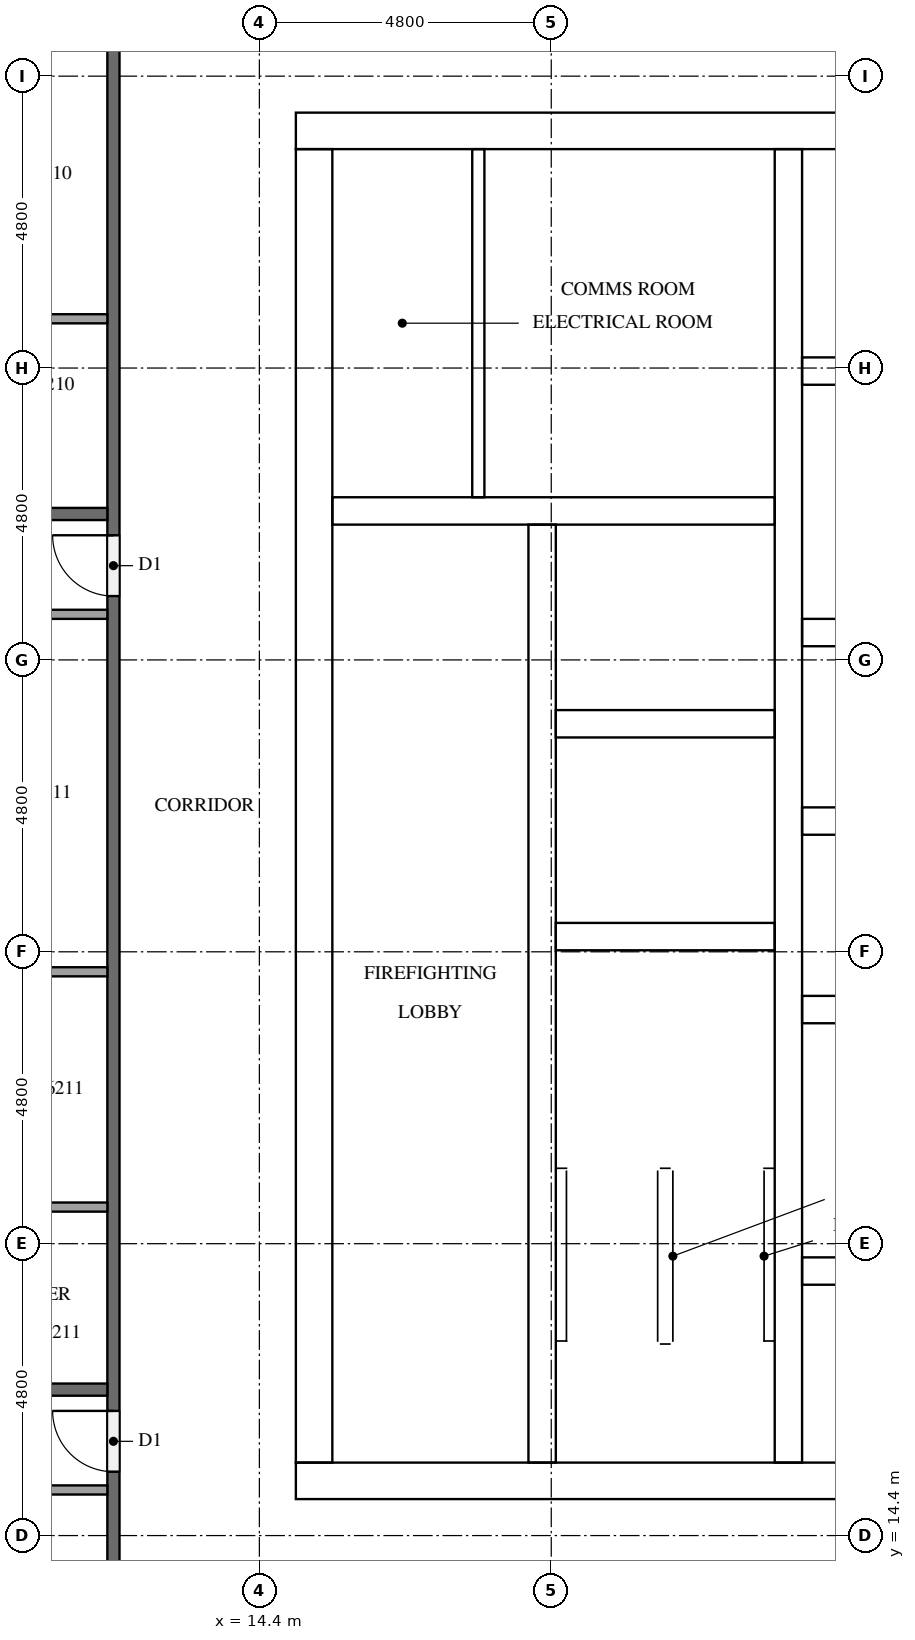
"""IFC4 building model, lengths in metres.
Left out: names, types, materials, properties, quantities, classifications, styles, units other than length and angle.
Written with IfcOpenShell. Run it as: python <this file> out.ifc"""

import sys

from ifc_helpers import new_model, si_unit, direction, frame, frame_2d, origin, place, context, subcontext, project, spatial, rectangle, extrude, element, fill, save


model = new_model("IFC4")
c1 = context("Model", 3, precision=1e-05, world=origin(), true_north=direction((0.0, 1.0)))
c2 = subcontext(c1, "Body", "Model", "MODEL_VIEW")
j1 = project(units=[si_unit("LENGTHUNIT", "METRE"), si_unit("PLANEANGLEUNIT", "RADIAN")], contexts=[c1])
p1 = place(None, origin())
s1 = spatial("IfcSite", under=j1, at=p1, CompositionType="ELEMENT")
p2 = place(p1, origin())
s2 = spatial("IfcBuilding", under=s1, at=p2, CompositionType="ELEMENT")
p3 = place(p2, frame((0.0, 0.0, 238.7)))
s3 = spatial("IfcBuildingStorey", under=s2, at=p3, CompositionType="ELEMENT", Elevation=238.7)
p4 = place(p3, frame((15.0, 15.3, 0.0), z_axis=(0.0, 0.0, 1.0), x_axis=(1.0, 0.0, 0.0)))
e1 = element("IfcWall", 1, at=p4, inside=s3, PredefinedType="SHEAR", context=c2, shape_type="SweptSolid", body=[
    extrude(rectangle(XDim=32.4, YDim=0.6, at=frame_2d((16.2, 0.0))), origin(), (0.0, 0.0, 1.0), 3.2),
])
p5 = place(p4, frame((15.3, 0.0, 0.0)))
e2 = element("IfcOpeningElement", 2, at=p5, cuts=e1, PredefinedType="OPENING", context=c2, shape_type="SweptSolid", body=[
    extrude(rectangle(XDim=1.8, YDim=2.1, at=frame_2d((0.9, 1.05))), frame((0.0, 0.31, 0.0), z_axis=(0.0, -1.0, 0.0), x_axis=(1.0, 0.0, 0.0)), (0.0, 0.0, 1.0), 0.62),
])
p6 = place(p3, frame((15.0, 37.5, 0.0), z_axis=(0.0, 0.0, 1.0), x_axis=(1.0, 0.0, 0.0)))
e3 = element("IfcWall", 3, at=p6, inside=s3, PredefinedType="SHEAR", context=c2, shape_type="SweptSolid", body=[
    extrude(rectangle(XDim=32.4, YDim=0.6, at=frame_2d((16.2, 0.0))), origin(), (0.0, 0.0, 1.0), 3.2),
])
p7 = place(p6, frame((15.3, 0.0, 0.0)))
e4 = element("IfcOpeningElement", 4, at=p7, cuts=e3, PredefinedType="OPENING", context=c2, shape_type="SweptSolid", body=[
    extrude(rectangle(XDim=1.8, YDim=2.1, at=frame_2d((0.9, 1.05))), frame((0.0, 0.31, 0.0), z_axis=(0.0, -1.0, 0.0), x_axis=(1.0, 0.0, 0.0)), (0.0, 0.0, 1.0), 0.62),
])
p8 = place(p6, frame((1.25, 0.0, 0.0)))
e5 = element("IfcOpeningElement", 5, at=p8, cuts=e3, PredefinedType="OPENING", context=c2, shape_type="SweptSolid", body=[
    extrude(rectangle(XDim=1.0, YDim=2.1, at=frame_2d((0.5, 1.05))), frame((0.0, 0.31, 0.0), z_axis=(0.0, -1.0, 0.0), x_axis=(1.0, 0.0, 0.0)), (0.0, 0.0, 1.0), 0.62),
])
p9 = place(p6, frame((4.988, 0.0, 0.0)))
e6 = element("IfcOpeningElement", 6, at=p9, cuts=e3, PredefinedType="OPENING", context=c2, shape_type="SweptSolid", body=[
    extrude(rectangle(XDim=1.0, YDim=2.1, at=frame_2d((0.5, 1.05))), frame((0.0, 0.31, 0.0), z_axis=(0.0, -1.0, 0.0), x_axis=(1.0, 0.0, 0.0)), (0.0, 0.0, 1.0), 0.62),
])
p10 = place(p3, frame((15.3, 15.6, 0.0), z_axis=(0.0, 0.0, 1.0), x_axis=(0.0, 1.0, 0.0)))
e7 = element("IfcWall", 7, at=p10, inside=s3, PredefinedType="SHEAR", context=c2, shape_type="SweptSolid", body=[
    extrude(rectangle(XDim=21.6, YDim=0.6, at=frame_2d((10.8, 0.0))), origin(), (0.0, 0.0, 1.0), 3.2),
])
p11 = place(p10, frame((5.16, 0.0, 0.0)))
e8 = element("IfcOpeningElement", 8, at=p11, cuts=e7, PredefinedType="OPENING", context=c2, shape_type="SweptSolid", body=[
    extrude(rectangle(XDim=1.2, YDim=2.1, at=frame_2d((0.6, 1.05))), frame((0.0, 0.31, 0.0), z_axis=(0.0, -1.0, 0.0), x_axis=(1.0, 0.0, 0.0)), (0.0, 0.0, 1.0), 0.62),
])
p12 = place(p3, frame((19.05, 15.6, 0.0), z_axis=(0.0, 0.0, 1.0), x_axis=(0.0, 1.0, 0.0)))
e9 = element("IfcWall", 9, at=p12, inside=s3, PredefinedType="SHEAR", context=c2, shape_type="SweptSolid", body=[
    extrude(rectangle(XDim=15.425, YDim=0.45, at=frame_2d((7.712, 0.0))), origin(), (0.0, 0.0, 1.0), 3.2),
])
p13 = place(p12, frame((9.85, 0.0, 0.0)))
e10 = element("IfcOpeningElement", 10, at=p13, cuts=e9, PredefinedType="OPENING", context=c2, shape_type="SweptSolid", body=[
    extrude(rectangle(XDim=1.1, YDim=2.1, at=frame_2d((0.55, 1.05))), frame((0.0, 0.235, 0.0), z_axis=(0.0, -1.0, 0.0), x_axis=(1.0, 0.0, 0.0)), (0.0, 0.0, 1.0), 0.47),
])
p14 = place(p12, frame((13.35, 0.0, 0.0)))
e11 = element("IfcOpeningElement", 11, at=p14, cuts=e9, PredefinedType="OPENING", context=c2, shape_type="SweptSolid", body=[
    extrude(rectangle(XDim=1.1, YDim=2.1, at=frame_2d((0.55, 1.05))), frame((0.0, 0.235, 0.0), z_axis=(0.0, -1.0, 0.0), x_axis=(1.0, 0.0, 0.0)), (0.0, 0.0, 1.0), 0.47),
])
p15 = place(p12, frame((0.6, 0.0, 0.0)))
e12 = element("IfcOpeningElement", 12, at=p15, cuts=e9, PredefinedType="OPENING", context=c2, shape_type="SweptSolid", body=[
    extrude(rectangle(XDim=1.2, YDim=2.1, at=frame_2d((0.6, 1.05))), frame((0.0, 0.235, 0.0), z_axis=(0.0, -1.0, 0.0), x_axis=(1.0, 0.0, 0.0)), (0.0, 0.0, 1.0), 0.47),
])
p16 = place(p3, frame((23.1, 15.6, 0.0), z_axis=(0.0, 0.0, 1.0), x_axis=(0.0, 1.0, 0.0)))
e13 = element("IfcWall", 13, at=p16, inside=s3, PredefinedType="SHEAR", context=c2, shape_type="SweptSolid", body=[
    extrude(rectangle(XDim=21.6, YDim=0.45, at=frame_2d((10.8, 0.0))), origin(), (0.0, 0.0, 1.0), 3.2),
])
for number, where, z_axis, x_axis in (
    (14, (19.275, 24.25, 0.0), (0.0, 0.0, 1.0), (1.0, 0.0, 0.0)),
    (15, (19.275, 27.75, 0.0), (0.0, 0.0, 1.0), (1.0, 0.0, 0.0)),
):
    element("IfcWall", number, at=place(p3, frame(where, z_axis=z_axis, x_axis=x_axis)), inside=s3, PredefinedType="SHEAR", context=c2, shape_type="SweptSolid", body=[
        extrude(rectangle(XDim=3.6, YDim=0.45, at=frame_2d((1.8, 0.0))), origin(), (0.0, 0.0, 1.0), 3.2),
    ])
p17 = place(p3, frame((15.6, 31.25, 0.0), z_axis=(0.0, 0.0, 1.0), x_axis=(1.0, 0.0, 0.0)))
e16 = element("IfcWall", 16, at=p17, inside=s3, PredefinedType="SHEAR", context=c2, shape_type="SweptSolid", body=[
    extrude(rectangle(XDim=7.275, YDim=0.45, at=frame_2d((3.637, 0.0))), origin(), (0.0, 0.0, 1.0), 3.2),
])
p18 = place(p3, frame((23.325, 18.75, 0.0), z_axis=(0.0, 0.0, 1.0), x_axis=(1.0, 0.0, 0.0)))
e17 = element("IfcWall", 17, at=p18, inside=s3, PredefinedType="SHEAR", context=c2, shape_type="SweptSolid", body=[
    extrude(rectangle(XDim=5.6, YDim=0.45, at=frame_2d((2.8, 0.0))), origin(), (0.0, 0.0, 1.0), 3.2),
])
p19 = place(p18, frame((1.046, 0.0, 0.0)))
e18 = element("IfcOpeningElement", 18, at=p19, cuts=e17, PredefinedType="OPENING", context=c2, shape_type="SweptSolid", body=[
    extrude(rectangle(XDim=1.0, YDim=2.1, at=frame_2d((0.5, 1.05))), frame((0.0, 0.235, 0.0), z_axis=(0.0, -1.0, 0.0), x_axis=(1.0, 0.0, 0.0)), (0.0, 0.0, 1.0), 0.47),
])
p20 = place(p18, frame((3.721, 0.0, 0.0)))
e19 = element("IfcOpeningElement", 19, at=p20, cuts=e17, PredefinedType="OPENING", context=c2, shape_type="SweptSolid", body=[
    extrude(rectangle(XDim=1.0, YDim=2.1, at=frame_2d((0.5, 1.05))), frame((0.0, 0.235, 0.0), z_axis=(0.0, -1.0, 0.0), x_axis=(1.0, 0.0, 0.0)), (0.0, 0.0, 1.0), 0.47),
])
p21 = place(p3, frame((23.325, 23.05, 0.0), z_axis=(0.0, 0.0, 1.0), x_axis=(1.0, 0.0, 0.0)))
e20 = element("IfcWall", 20, at=p21, inside=s3, PredefinedType="SHEAR", context=c2, shape_type="SweptSolid", body=[
    extrude(rectangle(XDim=15.75, YDim=0.45, at=frame_2d((7.875, 0.0))), origin(), (0.0, 0.0, 1.0), 3.2),
])
p22 = place(p21, frame((2.058, 0.0, 0.0)))
e21 = element("IfcOpeningElement", 21, at=p22, cuts=e20, PredefinedType="OPENING", context=c2, shape_type="SweptSolid", body=[
    extrude(rectangle(XDim=1.0, YDim=2.1, at=frame_2d((0.5, 1.05))), frame((0.0, 0.235, 0.0), z_axis=(0.0, -1.0, 0.0), x_axis=(1.0, 0.0, 0.0)), (0.0, 0.0, 1.0), 0.47),
])
p23 = place(p21, frame((11.823, 0.0, 0.0)))
e22 = element("IfcOpeningElement", 22, at=p23, cuts=e20, PredefinedType="OPENING", context=c2, shape_type="SweptSolid", body=[
    extrude(rectangle(XDim=1.0, YDim=2.1, at=frame_2d((0.5, 1.05))), frame((0.0, 0.235, 0.0), z_axis=(0.0, -1.0, 0.0), x_axis=(1.0, 0.0, 0.0)), (0.0, 0.0, 1.0), 0.47),
])
p24 = place(p21, frame((14.481, 0.0, 0.0)))
e23 = element("IfcOpeningElement", 23, at=p24, cuts=e20, PredefinedType="OPENING", context=c2, shape_type="SweptSolid", body=[
    extrude(rectangle(XDim=1.0, YDim=2.1, at=frame_2d((0.5, 1.05))), frame((0.0, 0.235, 0.0), z_axis=(0.0, -1.0, 0.0), x_axis=(1.0, 0.0, 0.0)), (0.0, 0.0, 1.0), 0.47),
])
p25 = place(p3, frame((23.325, 26.15, 0.0), z_axis=(0.0, 0.0, 1.0), x_axis=(1.0, 0.0, 0.0)))
e24 = element("IfcWall", 24, at=p25, inside=s3, PredefinedType="SHEAR", context=c2, shape_type="SweptSolid", body=[
    extrude(rectangle(XDim=15.75, YDim=0.45, at=frame_2d((7.875, 0.0))), origin(), (0.0, 0.0, 1.0), 3.2),
])
p26 = place(p3, frame((23.325, 29.25, 0.0), z_axis=(0.0, 0.0, 1.0), x_axis=(1.0, 0.0, 0.0)))
e25 = element("IfcWall", 25, at=p26, inside=s3, PredefinedType="SHEAR", context=c2, shape_type="SweptSolid", body=[
    extrude(rectangle(XDim=15.75, YDim=0.45, at=frame_2d((7.875, 0.0))), origin(), (0.0, 0.0, 1.0), 3.2),
])
p27 = place(p26, frame((0.679, 0.0, 0.0)))
e26 = element("IfcOpeningElement", 26, at=p27, cuts=e25, PredefinedType="OPENING", context=c2, shape_type="SweptSolid", body=[
    extrude(rectangle(XDim=1.1, YDim=2.1, at=frame_2d((0.55, 1.05))), frame((0.0, 0.235, 0.0), z_axis=(0.0, -1.0, 0.0), x_axis=(1.0, 0.0, 0.0)), (0.0, 0.0, 1.0), 0.47),
])
p28 = place(p26, frame((3.337, 0.0, 0.0)))
e27 = element("IfcOpeningElement", 27, at=p28, cuts=e25, PredefinedType="OPENING", context=c2, shape_type="SweptSolid", body=[
    extrude(rectangle(XDim=1.1, YDim=2.1, at=frame_2d((0.55, 1.05))), frame((0.0, 0.235, 0.0), z_axis=(0.0, -1.0, 0.0), x_axis=(1.0, 0.0, 0.0)), (0.0, 0.0, 1.0), 0.47),
])
p29 = place(p26, frame((5.996, 0.0, 0.0)))
e28 = element("IfcOpeningElement", 28, at=p29, cuts=e25, PredefinedType="OPENING", context=c2, shape_type="SweptSolid", body=[
    extrude(rectangle(XDim=1.1, YDim=2.1, at=frame_2d((0.55, 1.05))), frame((0.0, 0.235, 0.0), z_axis=(0.0, -1.0, 0.0), x_axis=(1.0, 0.0, 0.0)), (0.0, 0.0, 1.0), 0.47),
])
p30 = place(p26, frame((8.654, 0.0, 0.0)))
e29 = element("IfcOpeningElement", 29, at=p30, cuts=e25, PredefinedType="OPENING", context=c2, shape_type="SweptSolid", body=[
    extrude(rectangle(XDim=1.1, YDim=2.1, at=frame_2d((0.55, 1.05))), frame((0.0, 0.235, 0.0), z_axis=(0.0, -1.0, 0.0), x_axis=(1.0, 0.0, 0.0)), (0.0, 0.0, 1.0), 0.47),
])
p31 = place(p26, frame((11.312, 0.0, 0.0)))
e30 = element("IfcOpeningElement", 30, at=p31, cuts=e25, PredefinedType="OPENING", context=c2, shape_type="SweptSolid", body=[
    extrude(rectangle(XDim=1.1, YDim=2.1, at=frame_2d((0.55, 1.05))), frame((0.0, 0.235, 0.0), z_axis=(0.0, -1.0, 0.0), x_axis=(1.0, 0.0, 0.0)), (0.0, 0.0, 1.0), 0.47),
])
p32 = place(p26, frame((13.971, 0.0, 0.0)))
e31 = element("IfcOpeningElement", 31, at=p32, cuts=e25, PredefinedType="OPENING", context=c2, shape_type="SweptSolid", body=[
    extrude(rectangle(XDim=1.1, YDim=2.1, at=frame_2d((0.55, 1.05))), frame((0.0, 0.235, 0.0), z_axis=(0.0, -1.0, 0.0), x_axis=(1.0, 0.0, 0.0)), (0.0, 0.0, 1.0), 0.47),
])
p33 = place(p3, frame((23.325, 33.55, 0.0), z_axis=(0.0, 0.0, 1.0), x_axis=(1.0, 0.0, 0.0)))
e32 = element("IfcWall", 32, at=p33, inside=s3, PredefinedType="SHEAR", context=c2, shape_type="SweptSolid", body=[
    extrude(rectangle(XDim=5.6, YDim=0.45, at=frame_2d((2.8, 0.0))), origin(), (0.0, 0.0, 1.0), 3.2),
])
p34 = place(p33, frame((1.201, 0.0, 0.0)))
e33 = element("IfcOpeningElement", 33, at=p34, cuts=e32, PredefinedType="OPENING", context=c2, shape_type="SweptSolid", body=[
    extrude(rectangle(XDim=1.0, YDim=2.1, at=frame_2d((0.5, 1.05))), frame((0.0, 0.235, 0.0), z_axis=(0.0, -1.0, 0.0), x_axis=(1.0, 0.0, 0.0)), (0.0, 0.0, 1.0), 0.47),
])
p35 = place(p33, frame((3.876, 0.0, 0.0)))
e34 = element("IfcOpeningElement", 34, at=p35, cuts=e32, PredefinedType="OPENING", context=c2, shape_type="SweptSolid", body=[
    extrude(rectangle(XDim=1.0, YDim=2.1, at=frame_2d((0.5, 1.05))), frame((0.0, 0.235, 0.0), z_axis=(0.0, -1.0, 0.0), x_axis=(1.0, 0.0, 0.0)), (0.0, 0.0, 1.0), 0.47),
])
p36 = place(p3, frame((18.001, 31.475, 0.0), z_axis=(0.0, 0.0, 1.0), x_axis=(0.0, 1.0, 0.0)))
e35 = element("IfcWall", 35, at=p36, inside=s3, PredefinedType="PARTITIONING", context=c2, shape_type="SweptSolid", body=[
    extrude(rectangle(XDim=5.725, YDim=0.2, at=frame_2d((2.862, 0.0))), origin(), (0.0, 0.0, 1.0), 3.2),
])
p37 = place(p3, frame((12.0, 12.1, 0.0), z_axis=(0.0, 0.0, 1.0), x_axis=(0.0, 1.0, 0.0)))
e36 = element("IfcWall", 36, at=p37, inside=s3, PredefinedType="PARTITIONING", context=c2, shape_type="SweptSolid", body=[
    extrude(rectangle(XDim=28.6, YDim=0.2, at=frame_2d((14.3, 0.0))), origin(), (0.0, 0.0, 1.0), 3.2),
])
p38 = place(p37, frame((27.35, 0.0, 0.0)))
e37 = element("IfcOpeningElement", 37, at=p38, cuts=e36, PredefinedType="OPENING", context=c2, shape_type="SweptSolid", body=[
    extrude(rectangle(XDim=1.0, YDim=2.1, at=frame_2d((0.5, 1.05))), frame((0.0, 0.11, 0.0), z_axis=(0.0, -1.0, 0.0), x_axis=(1.0, 0.0, 0.0)), (0.0, 0.0, 1.0), 0.22),
])
p39 = place(p37, frame((17.75, 0.0, 0.0)))
e38 = element("IfcOpeningElement", 38, at=p39, cuts=e36, PredefinedType="OPENING", context=c2, shape_type="SweptSolid", body=[
    extrude(rectangle(XDim=1.0, YDim=2.1, at=frame_2d((0.5, 1.05))), frame((0.0, 0.11, 0.0), z_axis=(0.0, -1.0, 0.0), x_axis=(1.0, 0.0, 0.0)), (0.0, 0.0, 1.0), 0.22),
])
p40 = place(p37, frame((3.35, 0.0, 0.0)))
e39 = element("IfcOpeningElement", 39, at=p40, cuts=e36, PredefinedType="OPENING", context=c2, shape_type="SweptSolid", body=[
    extrude(rectangle(XDim=1.0, YDim=2.1, at=frame_2d((0.5, 1.05))), frame((0.0, 0.11, 0.0), z_axis=(0.0, -1.0, 0.0), x_axis=(1.0, 0.0, 0.0)), (0.0, 0.0, 1.0), 0.22),
])
for number, where, z_axis, x_axis in (
    (40, (0.1, 31.2, 0.0), (0.0, 0.0, 1.0), (1.0, 0.0, 0.0)),
    (41, (0.1, 16.8, 0.0), (0.0, 0.0, 1.0), (1.0, 0.0, 0.0)),
):
    element("IfcWall", number, at=place(p3, frame(where, z_axis=z_axis, x_axis=x_axis)), inside=s3, PredefinedType="PARTITIONING", context=c2, shape_type="SweptSolid", body=[
        extrude(rectangle(XDim=11.8, YDim=0.2, at=frame_2d((5.9, 0.0))), origin(), (0.0, 0.0, 1.0), 3.2),
    ])
for number, where, z_axis, x_axis in (
    (42, (11.9, 34.41, 0.0), (0.0, 0.0, 1.0), (-1.0, 0.0, 0.0)),
    (43, (11.9, 23.671, 0.0), (0.0, 0.0, 1.0), (-1.0, 0.0, 0.0)),
    (44, (11.9, 19.802, 0.0), (0.0, 0.0, 1.0), (-1.0, 0.0, 0.0)),
):
    element("IfcWall", number, at=place(p3, frame(where, z_axis=z_axis, x_axis=x_axis)), inside=s3, PredefinedType="PARTITIONING", context=c2, shape_type="SweptSolid", body=[
        extrude(rectangle(XDim=3.275, YDim=0.15, at=frame_2d((1.637, 0.0))), origin(), (0.0, 0.0, 1.0), 3.2),
    ])
p41 = place(p3, frame((11.9, 29.55, 0.0), z_axis=(0.0, 0.0, 1.0), x_axis=(-1.0, 0.0, 0.0)))
e45 = element("IfcWall", 45, at=p41, inside=s3, PredefinedType="PARTITIONING", context=c2, shape_type="SweptSolid", body=[
    extrude(rectangle(XDim=3.425, YDim=0.15, at=frame_2d((1.712, 0.0))), origin(), (0.0, 0.0, 1.0), 3.2),
])
p42 = place(p3, frame((11.9, 15.15, 0.0), z_axis=(0.0, 0.0, 1.0), x_axis=(-1.0, 0.0, 0.0)))
e46 = element("IfcWall", 46, at=p42, inside=s3, PredefinedType="PARTITIONING", context=c2, shape_type="SweptSolid", body=[
    extrude(rectangle(XDim=3.125, YDim=0.15, at=frame_2d((1.562, 0.0))), origin(), (0.0, 0.0, 1.0), 3.2),
])
p43 = place(p13, origin())
e47 = element("IfcDoor", 47, at=p43, inside=s3, OperationType="DOUBLE_DOOR_SLIDING", PredefinedType="DOOR", context=c2, shape_type="SweptSolid", body=[
    extrude(rectangle(XDim=1.1, YDim=2.1, at=frame_2d((0.55, 1.05))), frame((0.0, 0.025, 0.0), z_axis=(0.0, -1.0, 0.0), x_axis=(1.0, 0.0, 0.0)), (0.0, 0.0, 1.0), 0.05),
])
fill(e10, e47)
p44 = place(p14, origin())
e48 = element("IfcDoor", 48, at=p44, inside=s3, OperationType="DOUBLE_DOOR_SLIDING", PredefinedType="DOOR", context=c2, shape_type="SweptSolid", body=[
    extrude(rectangle(XDim=1.1, YDim=2.1, at=frame_2d((0.55, 1.05))), frame((0.0, 0.025, 0.0), z_axis=(0.0, -1.0, 0.0), x_axis=(1.0, 0.0, 0.0)), (0.0, 0.0, 1.0), 0.05),
])
fill(e11, e48)
p45 = place(p15, frame((1.2, 0.0, 0.0), z_axis=(0.0, 0.0, 1.0), x_axis=(-1.0, 0.0, 0.0)))
e49 = element("IfcDoor", 49, at=p45, inside=s3, OperationType="SINGLE_SWING_RIGHT", PredefinedType="DOOR", context=c2, shape_type="SweptSolid", body=[
    extrude(rectangle(XDim=1.2, YDim=2.1, at=frame_2d((0.6, 1.05))), frame((0.0, 0.025, 0.0), z_axis=(0.0, -1.0, 0.0), x_axis=(1.0, 0.0, 0.0)), (0.0, 0.0, 1.0), 0.05),
])
fill(e12, e49)
p46 = place(p11, frame((1.2, 0.0, 0.0), z_axis=(0.0, 0.0, 1.0), x_axis=(-1.0, 0.0, 0.0)))
e50 = element("IfcDoor", 50, at=p46, inside=s3, OperationType="SINGLE_SWING_LEFT", PredefinedType="DOOR", context=c2, shape_type="SweptSolid", body=[
    extrude(rectangle(XDim=1.2, YDim=2.1, at=frame_2d((0.6, 1.05))), frame((0.0, 0.025, 0.0), z_axis=(0.0, -1.0, 0.0), x_axis=(1.0, 0.0, 0.0)), (0.0, 0.0, 1.0), 0.05),
])
fill(e8, e50)
p47 = place(p8, origin())
e51 = element("IfcDoor", 51, at=p47, inside=s3, OperationType="SINGLE_SWING_LEFT", PredefinedType="DOOR", context=c2, shape_type="SweptSolid", body=[
    extrude(rectangle(XDim=1.0, YDim=2.1, at=frame_2d((0.5, 1.05))), frame((0.0, 0.025, 0.0), z_axis=(0.0, -1.0, 0.0), x_axis=(1.0, 0.0, 0.0)), (0.0, 0.0, 1.0), 0.05),
])
fill(e5, e51)
p48 = place(p9, origin())
e52 = element("IfcDoor", 52, at=p48, inside=s3, OperationType="SINGLE_SWING_RIGHT", PredefinedType="DOOR", context=c2, shape_type="SweptSolid", body=[
    extrude(rectangle(XDim=1.0, YDim=2.1, at=frame_2d((0.5, 1.05))), frame((0.0, 0.025, 0.0), z_axis=(0.0, -1.0, 0.0), x_axis=(1.0, 0.0, 0.0)), (0.0, 0.0, 1.0), 0.05),
])
fill(e6, e52)
p49 = place(p39, origin())
e53 = element("IfcDoor", 53, at=p49, inside=s3, OperationType="SINGLE_SWING_RIGHT", PredefinedType="DOOR", context=c2, shape_type="SweptSolid", body=[
    extrude(rectangle(XDim=1.0, YDim=2.1, at=frame_2d((0.5, 1.05))), frame((0.0, 0.025, 0.0), z_axis=(0.0, -1.0, 0.0), x_axis=(1.0, 0.0, 0.0)), (0.0, 0.0, 1.0), 0.05),
])
fill(e38, e53)
p50 = place(p40, origin())
e54 = element("IfcDoor", 54, at=p50, inside=s3, OperationType="SINGLE_SWING_RIGHT", PredefinedType="DOOR", context=c2, shape_type="SweptSolid", body=[
    extrude(rectangle(XDim=1.0, YDim=2.1, at=frame_2d((0.5, 1.05))), frame((0.0, 0.025, 0.0), z_axis=(0.0, -1.0, 0.0), x_axis=(1.0, 0.0, 0.0)), (0.0, 0.0, 1.0), 0.05),
])
fill(e39, e54)
save(model, sys.argv[1])
